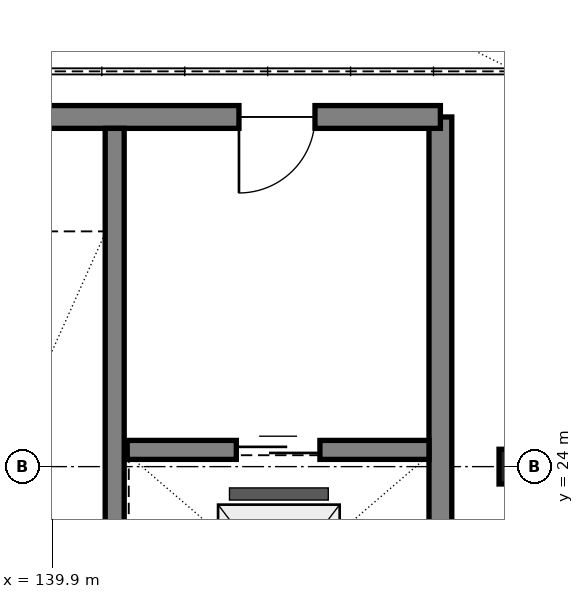
"""IFC4 building model, lengths in metres.
Left out: names, types, materials, properties, quantities, classifications, styles, units other than length and angle.
Written with IfcOpenShell. Run it as: python <this file> out.ifc"""

import sys

from ifc_helpers import new_model, si_unit, direction, frame, frame_2d, origin, origin_2d_with_axis, place, context, subcontext, project, spatial, rectangle, hollow_circle, extrude, element, fill, save


model = new_model("IFC4")
c1 = context("Model", 3, precision=1e-05, world=origin(), true_north=direction((0.0, 1.0)))
c2 = subcontext(c1, "Body", "Model", "MODEL_VIEW")
j1 = project(units=[si_unit("LENGTHUNIT", "METRE"), si_unit("PLANEANGLEUNIT", "RADIAN")], contexts=[c1])
p1 = place(None, origin())
s1 = spatial("IfcSite", under=j1, at=p1, CompositionType="ELEMENT")
p2 = place(p1, origin())
s2 = spatial("IfcBuilding", under=s1, at=p2, CompositionType="ELEMENT")
p3 = place(p2, frame((0.0, 0.0, 8.4)))
s3 = spatial("IfcBuildingStorey", under=s2, at=p3, CompositionType="ELEMENT", Elevation=8.4)
p4 = place(p3, frame((146.0, 24.0, 0.0), z_axis=(0.0, 0.0, 1.0), x_axis=(1.0, 0.0, 0.0)))
e1 = element("IfcColumn", 1, at=p4, inside=s3, PredefinedType="COLUMN", context=c2, shape_type="SweptSolid", body=[
    extrude(hollow_circle(Radius=0.229, WallThickness=0.013, at=origin_2d_with_axis()), origin(), (0.0, 0.0, 1.0), 6.0),
])
p5 = place(p3, frame((145.0, 20.6, 0.0), z_axis=(0.0, 0.0, 1.0), x_axis=(0.0, 1.0, 0.0)))
e2 = element("IfcWall", 2, at=p5, inside=s3, PredefinedType="SHEAR", context=c2, shape_type="SweptSolid", body=[
    extrude(rectangle(XDim=8.0, YDim=0.3, at=frame_2d((4.0, 0.0), x_axis=(1.0, 0.0))), origin(), (0.0, 0.0, 1.0), 3.36),
])
p6 = place(p3, frame((145.0, 28.6, 0.0), z_axis=(0.0, 0.0, 1.0), x_axis=(-1.0, 0.0, 0.0)))
e3 = element("IfcWall", 3, at=p6, inside=s3, PredefinedType="SHEAR", context=c2, shape_type="SweptSolid", body=[
    extrude(rectangle(XDim=7.4, YDim=0.3, at=frame_2d((3.7, 0.0), x_axis=(1.0, 0.0))), origin(), (0.0, 0.0, 1.0), 3.36),
])
p7 = place(p6, frame((1.65, 0.0, 0.0)))
e4 = element("IfcOpeningElement", 4, at=p7, cuts=e3, PredefinedType="OPENING", context=c2, shape_type="SweptSolid", body=[
    extrude(rectangle(XDim=1.0, YDim=2.15, at=frame_2d((0.5, 1.075), x_axis=(1.0, 0.0))), frame((0.0, 0.16, 0.0), z_axis=(0.0, -1.0, 0.0), x_axis=(1.0, 0.0, 0.0)), (0.0, 0.0, 1.0), 0.32),
])
p8 = place(p6, frame((5.3, 0.0, 0.0)))
e5 = element("IfcOpeningElement", 5, at=p8, cuts=e3, PredefinedType="OPENING", context=c2, shape_type="SweptSolid", body=[
    extrude(rectangle(XDim=1.0, YDim=2.15, at=frame_2d((0.5, 1.075), x_axis=(1.0, 0.0))), frame((0.0, 0.16, 0.0), z_axis=(0.0, -1.0, 0.0), x_axis=(1.0, 0.0, 0.0)), (0.0, 0.0, 1.0), 0.32),
])
p9 = place(p3, frame((140.715, 20.75, 0.0), z_axis=(0.0, 0.0, 1.0), x_axis=(0.0, 1.0, 0.0)))
e6 = element("IfcWall", 6, at=p9, inside=s3, PredefinedType="SHEAR", context=c2, shape_type="SweptSolid", body=[
    extrude(rectangle(XDim=7.7, YDim=0.25, at=frame_2d((3.85, 0.0), x_axis=(1.0, 0.0))), origin(), (0.0, 0.0, 1.0), 3.36),
])
p10 = place(p3, frame((140.88, 24.22, 0.0), z_axis=(0.0, 0.0, 1.0), x_axis=(1.0, 0.0, 0.0)))
e7 = element("IfcWall", 7, at=p10, inside=s3, PredefinedType="SHEAR", context=c2, shape_type="SweptSolid", body=[
    extrude(rectangle(XDim=3.97, YDim=0.25, at=frame_2d((1.985, 0.0), x_axis=(1.0, 0.0))), origin(), (0.0, 0.0, 1.0), 3.36),
])
p11 = place(p10, frame((1.435, 0.0, 0.0)))
e8 = element("IfcOpeningElement", 8, at=p11, cuts=e7, PredefinedType="OPENING", context=c2, shape_type="SweptSolid", body=[
    extrude(rectangle(XDim=1.1, YDim=2.15, at=frame_2d((0.55, 1.075), x_axis=(1.0, 0.0))), frame((0.0, 0.135, 0.0), z_axis=(0.0, -1.0, 0.0), x_axis=(1.0, 0.0, 0.0)), (0.0, 0.0, 1.0), 0.27),
])
p12 = place(p7, origin())
e9 = element("IfcDoor", 9, at=p12, inside=s3, OperationType="SINGLE_SWING_RIGHT", PredefinedType="DOOR", context=c2, shape_type="SweptSolid", body=[
    extrude(rectangle(XDim=1.0, YDim=2.15, at=frame_2d((0.5, 1.075), x_axis=(1.0, 0.0))), frame((0.0, 0.025, 0.0), z_axis=(0.0, -1.0, 0.0), x_axis=(1.0, 0.0, 0.0)), (0.0, 0.0, 1.0), 0.05),
])
fill(e4, e9)
p13 = place(p11, origin())
e10 = element("IfcDoor", 10, at=p13, inside=s3, OperationType="SLIDING_TO_LEFT", PredefinedType="DOOR", context=c2, shape_type="SweptSolid", body=[
    extrude(rectangle(XDim=1.1, YDim=2.15, at=frame_2d((0.55, 1.075), x_axis=(1.0, 0.0))), frame((0.0, 0.025, 0.0), z_axis=(0.0, -1.0, 0.0), x_axis=(1.0, 0.0, 0.0)), (0.0, 0.0, 1.0), 0.05),
])
fill(e8, e10)
save(model, sys.argv[1])
